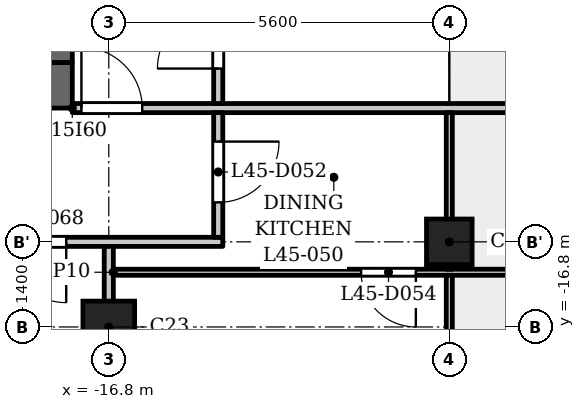
"""IFC4 building model, lengths in metres.
Left out: names, types, materials, properties, quantities, classifications, styles, units other than length and angle.
Written with IfcOpenShell. Run it as: python <this file> out.ifc"""

import sys

from ifc_helpers import new_model, si_unit, direction, frame, frame_2d, origin, origin_2d, place, context, subcontext, project, spatial, rectangle, extrude, element, fill, save


model = new_model("IFC4")
c1 = context("Model", 3, precision=1e-05, world=origin(), true_north=direction((0.0, 1.0)))
c2 = subcontext(c1, "Body", "Model", "MODEL_VIEW")
j1 = project(units=[si_unit("LENGTHUNIT", "METRE"), si_unit("PLANEANGLEUNIT", "RADIAN")], contexts=[c1])
p1 = place(None, origin())
s1 = spatial("IfcSite", under=j1, at=p1, CompositionType="ELEMENT")
p2 = place(p1, origin())
s2 = spatial("IfcBuilding", under=s1, at=p2, CompositionType="ELEMENT")
p3 = place(p2, frame((0.0, 0.0, 174.6)))
s3 = spatial("IfcBuildingStorey", under=s2, at=p3, CompositionType="ELEMENT", Elevation=174.6)
p4 = place(p3, frame((-16.8, -16.8, 0.0), z_axis=(0.0, 0.0, 1.0), x_axis=(1.0, 0.0, 0.0)))
e1 = element("IfcColumn", 1, at=p4, inside=s3, PredefinedType="COLUMN", context=c2, shape_type="SweptSolid", body=[
    extrude(rectangle(XDim=0.85, YDim=0.85, at=origin_2d()), origin(), (0.0, 0.0, 1.0), 3.5),
])
p5 = place(p3, frame((-11.2, -15.4, 0.0), z_axis=(0.0, 0.0, 1.0), x_axis=(1.0, 0.0, 0.0)))
e2 = element("IfcColumn", 2, at=p5, inside=s3, PredefinedType="COLUMN", context=c2, shape_type="SweptSolid", body=[
    extrude(rectangle(XDim=0.75, YDim=0.75, at=origin_2d()), origin(), (0.0, 0.0, 1.0), 3.5),
])
p6 = place(p3, frame((-17.4, -12.825, 0.0), z_axis=(0.0, 0.0, 1.0), x_axis=(-1.0, 0.0, 0.0)))
e3 = element("IfcWall", 3, at=p6, inside=s3, PredefinedType="SHEAR", context=c2, shape_type="SweptSolid", body=[
    extrude(rectangle(XDim=10.4, YDim=0.75, at=frame_2d((5.2, 0.0))), origin(), (0.0, 0.0, 1.0), 3.15),
])
p7 = place(p3, frame((-17.6, -12.45, 0.0), z_axis=(0.0, 0.0, 1.0), x_axis=(0.0, 1.0, 0.0)))
e4 = element("IfcWall", 4, at=p7, inside=s3, PredefinedType="SHEAR", context=c2, shape_type="SweptSolid", body=[
    extrude(rectangle(XDim=24.9, YDim=0.4, at=frame_2d((12.45, 0.0))), origin(), (0.0, 0.0, 1.0), 3.15),
])
p8 = place(p7, frame((8.65, 0.0, 0.0)))
e5 = element("IfcOpeningElement", 5, at=p8, cuts=e4, PredefinedType="OPENING", context=c2, shape_type="SweptSolid", body=[
    extrude(rectangle(XDim=0.9, YDim=2.1, at=frame_2d((0.45, 1.05))), frame((0.0, 0.21, 0.0), z_axis=(0.0, -1.0, 0.0), x_axis=(1.0, 0.0, 0.0)), (0.0, 0.0, 1.0), 0.42),
])
p9 = place(p7, frame((15.6, 0.0, 0.0)))
e6 = element("IfcOpeningElement", 6, at=p9, cuts=e4, PredefinedType="OPENING", context=c2, shape_type="SweptSolid", body=[
    extrude(rectangle(XDim=1.1, YDim=2.1, at=frame_2d((0.55, 1.05))), frame((0.0, 0.21, 0.0), z_axis=(0.0, -1.0, 0.0), x_axis=(1.0, 0.0, 0.0)), (0.0, 0.0, 1.0), 0.42),
])
p10 = place(p7, frame((18.0, 0.0, 0.0)))
e7 = element("IfcOpeningElement", 7, at=p10, cuts=e4, PredefinedType="OPENING", context=c2, shape_type="SweptSolid", body=[
    extrude(rectangle(XDim=1.1, YDim=2.1, at=frame_2d((0.55, 1.05))), frame((0.0, 0.21, 0.0), z_axis=(0.0, -1.0, 0.0), x_axis=(1.0, 0.0, 0.0)), (0.0, 0.0, 1.0), 0.42),
])
p11 = place(p7, frame((23.025, 0.0, 0.0)))
e8 = element("IfcOpeningElement", 8, at=p11, cuts=e4, PredefinedType="OPENING", context=c2, shape_type="SweptSolid", body=[
    extrude(rectangle(XDim=1.1, YDim=2.1, at=frame_2d((0.55, 1.05))), frame((0.0, 0.21, 0.0), z_axis=(0.0, -1.0, 0.0), x_axis=(1.0, 0.0, 0.0)), (0.0, 0.0, 1.0), 0.42),
])
p12 = place(p7, frame((0.775, 0.0, 0.0)))
e9 = element("IfcOpeningElement", 9, at=p12, cuts=e4, PredefinedType="OPENING", context=c2, shape_type="SweptSolid", body=[
    extrude(rectangle(XDim=1.1, YDim=2.1, at=frame_2d((0.55, 1.05))), frame((0.0, 0.21, 0.0), z_axis=(0.0, -1.0, 0.0), x_axis=(1.0, 0.0, 0.0)), (0.0, 0.0, 1.0), 0.42),
])
p13 = place(p7, frame((12.925, 0.0, 0.0)))
e10 = element("IfcOpeningElement", 10, at=p13, cuts=e4, PredefinedType="OPENING", context=c2, shape_type="SweptSolid", body=[
    extrude(rectangle(XDim=1.8, YDim=2.1, at=frame_2d((0.9, 1.05))), frame((0.0, 0.21, 0.0), z_axis=(0.0, -1.0, 0.0), x_axis=(1.0, 0.0, 0.0)), (0.0, 0.0, 1.0), 0.42),
])
p14 = place(p3, frame((-16.725, -15.9, 0.0), z_axis=(0.0, 0.0, 1.0), x_axis=(1.0, 0.0, 0.0)))
e11 = element("IfcWall", 11, at=p14, inside=s3, PredefinedType="PARTITIONING", context=c2, shape_type="SweptSolid", body=[
    extrude(rectangle(XDim=33.45, YDim=0.1, at=frame_2d((16.725, 0.0))), origin(), (0.0, 0.0, 1.0), 3.15),
])
p15 = place(p14, frame((9.675, 0.0, 0.0)))
e12 = element("IfcOpeningElement", 12, at=p15, cuts=e11, PredefinedType="OPENING", context=c2, shape_type="SweptSolid", body=[
    extrude(rectangle(XDim=0.8, YDim=2.1, at=frame_2d((0.4, 1.05))), frame((0.0, 0.06, 0.0), z_axis=(0.0, -1.0, 0.0), x_axis=(1.0, 0.0, 0.0)), (0.0, 0.0, 1.0), 0.12),
])
p16 = place(p14, frame((4.075, 0.0, 0.0)))
e13 = element("IfcOpeningElement", 13, at=p16, cuts=e11, PredefinedType="OPENING", context=c2, shape_type="SweptSolid", body=[
    extrude(rectangle(XDim=0.9, YDim=2.1, at=frame_2d((0.45, 1.05))), frame((0.0, 0.06, 0.0), z_axis=(0.0, -1.0, 0.0), x_axis=(1.0, 0.0, 0.0)), (0.0, 0.0, 1.0), 0.12),
])
p17 = place(p14, frame((20.875, 0.0, 0.0)))
e14 = element("IfcOpeningElement", 14, at=p17, cuts=e11, PredefinedType="OPENING", context=c2, shape_type="SweptSolid", body=[
    extrude(rectangle(XDim=0.8, YDim=2.1, at=frame_2d((0.4, 1.05))), frame((0.0, 0.06, 0.0), z_axis=(0.0, -1.0, 0.0), x_axis=(1.0, 0.0, 0.0)), (0.0, 0.0, 1.0), 0.12),
])
p18 = place(p14, frame((15.275, 0.0, 0.0)))
e15 = element("IfcOpeningElement", 15, at=p18, cuts=e11, PredefinedType="OPENING", context=c2, shape_type="SweptSolid", body=[
    extrude(rectangle(XDim=0.9, YDim=2.1, at=frame_2d((0.45, 1.05))), frame((0.0, 0.06, 0.0), z_axis=(0.0, -1.0, 0.0), x_axis=(1.0, 0.0, 0.0)), (0.0, 0.0, 1.0), 0.12),
])
p19 = place(p14, frame((30.825, 0.0, 0.0)))
e16 = element("IfcOpeningElement", 16, at=p19, cuts=e11, PredefinedType="OPENING", context=c2, shape_type="SweptSolid", body=[
    extrude(rectangle(XDim=0.8, YDim=2.1, at=frame_2d((0.4, 1.05))), frame((0.0, 0.06, 0.0), z_axis=(0.0, -1.0, 0.0), x_axis=(1.0, 0.0, 0.0)), (0.0, 0.0, 1.0), 0.12),
])
p20 = place(p14, frame((26.475, 0.0, 0.0)))
e17 = element("IfcOpeningElement", 17, at=p20, cuts=e11, PredefinedType="OPENING", context=c2, shape_type="SweptSolid", body=[
    extrude(rectangle(XDim=0.9, YDim=2.1, at=frame_2d((0.45, 1.05))), frame((0.0, 0.06, 0.0), z_axis=(0.0, -1.0, 0.0), x_axis=(1.0, 0.0, 0.0)), (0.0, 0.0, 1.0), 0.12),
])
p21 = place(p3, frame((-27.484, -15.4, 0.0), z_axis=(0.0, 0.0, 1.0), x_axis=(1.0, 0.0, 0.0)))
e18 = element("IfcWall", 18, at=p21, inside=s3, PredefinedType="PARTITIONING", context=c2, shape_type="SweptSolid", body=[
    extrude(rectangle(XDim=12.559, YDim=0.15, at=frame_2d((6.279, 0.0))), origin(), (0.0, 0.0, 1.0), 3.15),
])
p22 = place(p21, frame((8.984, 0.0, 0.0)))
e19 = element("IfcOpeningElement", 19, at=p22, cuts=e18, PredefinedType="OPENING", context=c2, shape_type="SweptSolid", body=[
    extrude(rectangle(XDim=1.0, YDim=2.1, at=frame_2d((0.5, 1.05))), frame((0.0, 0.085, 0.0), z_axis=(0.0, -1.0, 0.0), x_axis=(1.0, 0.0, 0.0)), (0.0, 0.0, 1.0), 0.17),
])
p23 = place(p3, frame((-17.4, -13.2, 0.0), z_axis=(0.0, 0.0, 1.0), x_axis=(1.0, 0.0, 0.0)))
e20 = element("IfcWall", 20, at=p23, inside=s3, PredefinedType="PARTITIONING", context=c2, shape_type="SweptSolid", body=[
    extrude(rectangle(XDim=34.8, YDim=0.15, at=frame_2d((17.4, 0.0))), origin(), (0.0, 0.0, 1.0), 3.15),
])
p24 = place(p23, frame((0.15, 0.0, 0.0)))
e21 = element("IfcOpeningElement", 21, at=p24, cuts=e20, PredefinedType="OPENING", context=c2, shape_type="SweptSolid", body=[
    extrude(rectangle(XDim=1.0, YDim=2.1, at=frame_2d((0.5, 1.05))), frame((0.0, 0.085, 0.0), z_axis=(0.0, -1.0, 0.0), x_axis=(1.0, 0.0, 0.0)), (0.0, 0.0, 1.0), 0.17),
])
p25 = place(p23, frame((33.55, 0.0, 0.0)))
e22 = element("IfcOpeningElement", 22, at=p25, cuts=e20, PredefinedType="OPENING", context=c2, shape_type="SweptSolid", body=[
    extrude(rectangle(XDim=1.0, YDim=2.1, at=frame_2d((0.5, 1.05))), frame((0.0, 0.085, 0.0), z_axis=(0.0, -1.0, 0.0), x_axis=(1.0, 0.0, 0.0)), (0.0, 0.0, 1.0), 0.17),
])
p26 = place(p23, frame((15.7, 0.0, 0.0)))
e23 = element("IfcOpeningElement", 23, at=p26, cuts=e20, PredefinedType="OPENING", context=c2, shape_type="SweptSolid", body=[
    extrude(rectangle(XDim=1.0, YDim=2.1, at=frame_2d((0.5, 1.05))), frame((0.0, 0.085, 0.0), z_axis=(0.0, -1.0, 0.0), x_axis=(1.0, 0.0, 0.0)), (0.0, 0.0, 1.0), 0.17),
])
p27 = place(p23, frame((26.9, 0.0, 0.0)))
e24 = element("IfcOpeningElement", 24, at=p27, cuts=e20, PredefinedType="OPENING", context=c2, shape_type="SweptSolid", body=[
    extrude(rectangle(XDim=1.0, YDim=2.1, at=frame_2d((0.5, 1.05))), frame((0.0, 0.085, 0.0), z_axis=(0.0, -1.0, 0.0), x_axis=(1.0, 0.0, 0.0)), (0.0, 0.0, 1.0), 0.17),
])
p28 = place(p3, frame((-16.8, -22.88, 0.0), z_axis=(0.0, 0.0, 1.0), x_axis=(0.0, 1.0, 0.0)))
e25 = element("IfcWall", 25, at=p28, inside=s3, PredefinedType="PARTITIONING", context=c2, shape_type="SweptSolid", body=[
    extrude(rectangle(XDim=7.405, YDim=0.15, at=frame_2d((3.702, 0.0))), origin(), (0.0, 0.0, 1.0), 3.15),
])
p29 = place(p3, frame((-15.0, -15.325, 0.0), z_axis=(0.0, 0.0, 1.0), x_axis=(0.0, 1.0, 0.0)))
e26 = element("IfcWall", 26, at=p29, inside=s3, PredefinedType="PARTITIONING", context=c2, shape_type="SweptSolid", body=[
    extrude(rectangle(XDim=2.05, YDim=0.15, at=frame_2d((1.025, 0.0))), origin(), (0.0, 0.0, 1.0), 3.15),
])
p30 = place(p29, frame((0.574, 0.0, 0.0)))
e27 = element("IfcOpeningElement", 27, at=p30, cuts=e26, PredefinedType="OPENING", context=c2, shape_type="SweptSolid", body=[
    extrude(rectangle(XDim=1.0, YDim=2.1, at=frame_2d((0.5, 1.05))), frame((0.0, 0.085, 0.0), z_axis=(0.0, -1.0, 0.0), x_axis=(1.0, 0.0, 0.0)), (0.0, 0.0, 1.0), 0.17),
])
p31 = place(p3, frame((-15.0, -13.125, 0.0), z_axis=(0.0, 0.0, 1.0), x_axis=(0.0, 1.0, 0.0)))
e28 = element("IfcWall", 28, at=p31, inside=s3, PredefinedType="PARTITIONING", context=c2, shape_type="SweptSolid", body=[
    extrude(rectangle(XDim=6.356, YDim=0.15, at=frame_2d((3.178, 0.0))), origin(), (0.0, 0.0, 1.0), 3.15),
])
p32 = place(p31, frame((0.575, 0.0, 0.0)))
e29 = element("IfcOpeningElement", 29, at=p32, cuts=e28, PredefinedType="OPENING", context=c2, shape_type="SweptSolid", body=[
    extrude(rectangle(XDim=1.0, YDim=2.1, at=frame_2d((0.5, 1.05))), frame((0.0, 0.085, 0.0), z_axis=(0.0, -1.0, 0.0), x_axis=(1.0, 0.0, 0.0)), (0.0, 0.0, 1.0), 0.17),
])
p33 = place(p3, frame((-11.2, -22.88, 0.0), z_axis=(0.0, 0.0, 1.0), x_axis=(0.0, 1.0, 0.0)))
e30 = element("IfcWall", 30, at=p33, inside=s3, PredefinedType="PARTITIONING", context=c2, shape_type="SweptSolid", body=[
    extrude(rectangle(XDim=6.93, YDim=0.1, at=frame_2d((3.465, 0.0))), origin(), (0.0, 0.0, 1.0), 3.15),
])
p34 = place(p33, frame((1.22, 0.0, 0.0)))
e31 = element("IfcOpeningElement", 31, at=p34, cuts=e30, PredefinedType="OPENING", context=c2, shape_type="SweptSolid", body=[
    extrude(rectangle(XDim=0.9, YDim=2.1, at=frame_2d((0.45, 1.05))), frame((0.0, 0.06, 0.0), z_axis=(0.0, -1.0, 0.0), x_axis=(1.0, 0.0, 0.0)), (0.0, 0.0, 1.0), 0.12),
])
p35 = place(p3, frame((-11.2, -15.85, 0.0), z_axis=(0.0, 0.0, 1.0), x_axis=(0.0, 1.0, 0.0)))
e32 = element("IfcWall", 32, at=p35, inside=s3, PredefinedType="PARTITIONING", context=c2, shape_type="SweptSolid", body=[
    extrude(rectangle(XDim=2.575, YDim=0.1, at=frame_2d((1.288, 0.0))), origin(), (0.0, 0.0, 1.0), 3.15),
])
p36 = place(p32, origin())
e33 = element("IfcDoor", 33, at=p36, inside=s3, OperationType="SINGLE_SWING_RIGHT", PredefinedType="DOOR", context=c2, shape_type="SweptSolid", body=[
    extrude(rectangle(XDim=1.0, YDim=2.1, at=frame_2d((0.5, 1.05))), frame((0.0, 0.025, 0.0), z_axis=(0.0, -1.0, 0.0), x_axis=(1.0, 0.0, 0.0)), (0.0, 0.0, 1.0), 0.05),
])
fill(e29, e33)
p37 = place(p24, origin())
e34 = element("IfcDoor", 34, at=p37, inside=s3, OperationType="SINGLE_SWING_RIGHT", PredefinedType="DOOR", context=c2, shape_type="SweptSolid", body=[
    extrude(rectangle(XDim=1.0, YDim=2.1, at=frame_2d((0.5, 1.05))), frame((0.0, 0.025, 0.0), z_axis=(0.0, -1.0, 0.0), x_axis=(1.0, 0.0, 0.0)), (0.0, 0.0, 1.0), 0.05),
])
fill(e21, e34)
p38 = place(p30, origin())
e35 = element("IfcDoor", 35, at=p38, inside=s3, OperationType="SINGLE_SWING_RIGHT", PredefinedType="DOOR", context=c2, shape_type="SweptSolid", body=[
    extrude(rectangle(XDim=1.0, YDim=2.1, at=frame_2d((0.5, 1.05))), frame((0.0, 0.025, 0.0), z_axis=(0.0, -1.0, 0.0), x_axis=(1.0, 0.0, 0.0)), (0.0, 0.0, 1.0), 0.05),
])
fill(e27, e35)
p39 = place(p16, origin())
e36 = element("IfcDoor", 36, at=p39, inside=s3, OperationType="SINGLE_SWING_RIGHT", PredefinedType="DOOR", context=c2, shape_type="SweptSolid", body=[
    extrude(rectangle(XDim=0.9, YDim=2.1, at=frame_2d((0.45, 1.05))), frame((0.0, 0.025, 0.0), z_axis=(0.0, -1.0, 0.0), x_axis=(1.0, 0.0, 0.0)), (0.0, 0.0, 1.0), 0.05),
])
fill(e13, e36)
p40 = place(p22, origin())
e37 = element("IfcDoor", 37, at=p40, inside=s3, OperationType="SINGLE_SWING_RIGHT", PredefinedType="DOOR", context=c2, shape_type="SweptSolid", body=[
    extrude(rectangle(XDim=1.0, YDim=2.1, at=frame_2d((0.5, 1.05))), frame((0.0, 0.025, 0.0), z_axis=(0.0, -1.0, 0.0), x_axis=(1.0, 0.0, 0.0)), (0.0, 0.0, 1.0), 0.05),
])
fill(e19, e37)
save(model, sys.argv[1])
